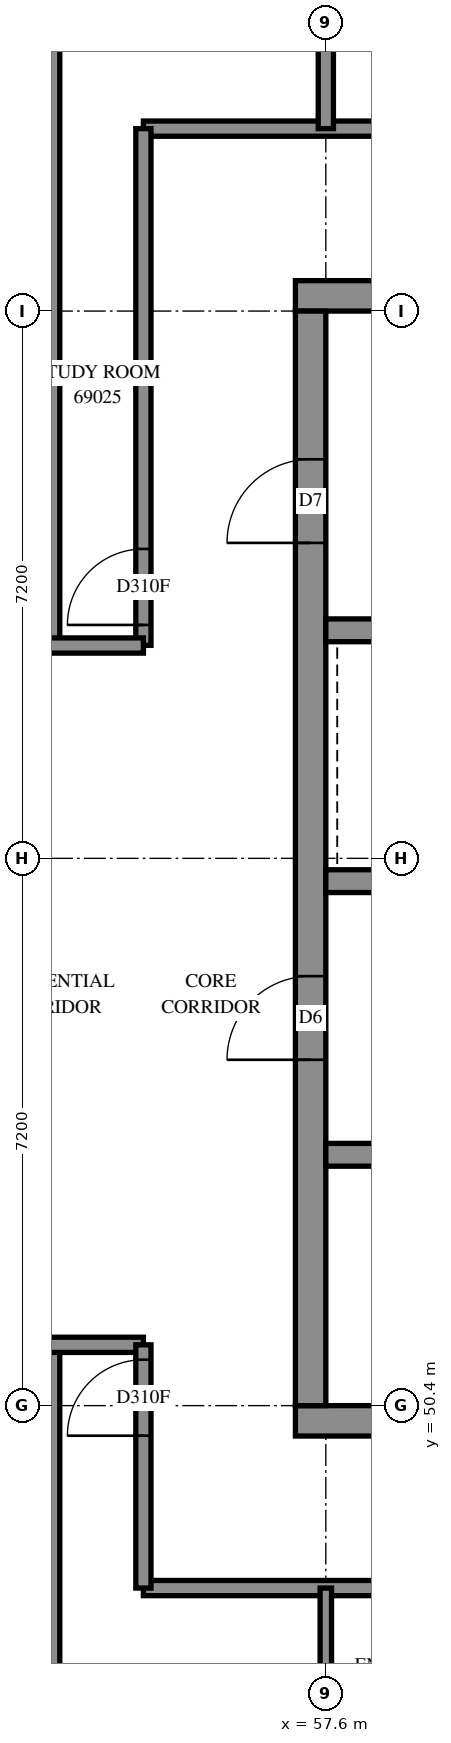
"""IFC4 building model, lengths in metres.
Left out: names, types, materials, properties, quantities, classifications, styles, units other than length and angle.
Written with IfcOpenShell. Run it as: python <this file> out.ifc"""

import sys

from ifc_helpers import new_model, si_unit, direction, frame, frame_2d, origin, place, context, subcontext, project, spatial, rectangle, extrude, element, fill, save


model = new_model("IFC4")
c1 = context("Model", 3, precision=1e-05, world=origin(), true_north=direction((0.0, 1.0)))
c2 = subcontext(c1, "Body", "Model", "MODEL_VIEW")
j1 = project(units=[si_unit("LENGTHUNIT", "METRE"), si_unit("PLANEANGLEUNIT", "RADIAN")], contexts=[c1])
p1 = place(None, origin())
s1 = spatial("IfcSite", under=j1, at=p1, CompositionType="ELEMENT")
p2 = place(p1, origin())
s2 = spatial("IfcBuilding", under=s1, at=p2, CompositionType="ELEMENT")
p3 = place(p2, frame((0.0, 0.0, 254.0)))
s3 = spatial("IfcBuildingStorey", under=s2, at=p3, CompositionType="ELEMENT", Elevation=254.0)
p4 = place(p3, frame((57.2, 50.2, -0.3), z_axis=(0.0, 0.0, 1.0), x_axis=(1.0, 0.0, 0.0)))
e1 = element("IfcWall", 1, at=p4, inside=s3, PredefinedType="SHEAR", context=c2, shape_type="SweptSolid", body=[
    extrude(rectangle(XDim=15.2, YDim=0.4, at=frame_2d((7.6, 0.0))), origin(), (0.0, 0.0, 1.0), 2.7),
])
p5 = place(p3, frame((57.2, 65.0, -0.3), z_axis=(0.0, 0.0, 1.0), x_axis=(1.0, 0.0, 0.0)))
e2 = element("IfcWall", 2, at=p5, inside=s3, PredefinedType="SHEAR", context=c2, shape_type="SweptSolid", body=[
    extrude(rectangle(XDim=15.2, YDim=0.4, at=frame_2d((7.6, 0.0))), origin(), (0.0, 0.0, 1.0), 2.7),
])
p6 = place(p5, frame((10.4, 0.0, 0.3)))
e3 = element("IfcOpeningElement", 3, at=p6, cuts=e2, PredefinedType="OPENING", context=c2, shape_type="SweptSolid", body=[
    extrude(rectangle(XDim=0.8, YDim=2.1, at=frame_2d((0.4, 1.05))), frame((0.0, 0.21, 0.0), z_axis=(0.0, -1.0, 0.0), x_axis=(1.0, 0.0, 0.0)), (0.0, 0.0, 1.0), 0.42),
])
p7 = place(p3, frame((57.4, 50.4, -0.3), z_axis=(0.0, 0.0, 1.0), x_axis=(0.0, 1.0, 0.0)))
e4 = element("IfcWall", 4, at=p7, inside=s3, PredefinedType="SHEAR", context=c2, shape_type="SweptSolid", body=[
    extrude(rectangle(XDim=14.4, YDim=0.4, at=frame_2d((7.2, 0.0))), origin(), (0.0, 0.0, 1.0), 2.7),
])
p8 = place(p7, frame((4.55, 0.0, 0.3)))
e5 = element("IfcOpeningElement", 5, at=p8, cuts=e4, PredefinedType="OPENING", context=c2, shape_type="SweptSolid", body=[
    extrude(rectangle(XDim=1.1, YDim=2.1, at=frame_2d((0.55, 1.05))), frame((0.0, 0.21, 0.0), z_axis=(0.0, -1.0, 0.0), x_axis=(1.0, 0.0, 0.0)), (0.0, 0.0, 1.0), 0.42),
])
p9 = place(p7, frame((11.35, 0.0, 0.3)))
e6 = element("IfcOpeningElement", 6, at=p9, cuts=e4, PredefinedType="OPENING", context=c2, shape_type="SweptSolid", body=[
    extrude(rectangle(XDim=1.1, YDim=2.1, at=frame_2d((0.55, 1.05))), frame((0.0, 0.21, 0.0), z_axis=(0.0, -1.0, 0.0), x_axis=(1.0, 0.0, 0.0)), (0.0, 0.0, 1.0), 0.42),
])
p10 = place(p3, frame((57.6, 53.7, 0.0), z_axis=(0.0, 0.0, 1.0), x_axis=(1.0, 0.0, 0.0)))
e7 = element("IfcWall", 7, at=p10, inside=s3, PredefinedType="SOLIDWALL", context=c2, shape_type="SweptSolid", body=[
    extrude(rectangle(XDim=14.4, YDim=0.3, at=frame_2d((7.2, 0.0))), origin(), (0.0, 0.0, 1.0), 3.1),
])
p11 = place(p10, frame((1.35, 0.0, 0.0)))
e8 = element("IfcOpeningElement", 8, at=p11, cuts=e7, PredefinedType="OPENING", context=c2, shape_type="SweptSolid", body=[
    extrude(rectangle(XDim=0.9, YDim=2.1, at=frame_2d((0.45, 1.05))), frame((0.0, 0.16, 0.0), z_axis=(0.0, -1.0, 0.0), x_axis=(1.0, 0.0, 0.0)), (0.0, 0.0, 1.0), 0.32),
])
p12 = place(p10, frame((4.95, 0.0, 0.0)))
e9 = element("IfcOpeningElement", 9, at=p12, cuts=e7, PredefinedType="OPENING", context=c2, shape_type="SweptSolid", body=[
    extrude(rectangle(XDim=0.9, YDim=2.1, at=frame_2d((0.45, 1.05))), frame((0.0, 0.16, 0.0), z_axis=(0.0, -1.0, 0.0), x_axis=(1.0, 0.0, 0.0)), (0.0, 0.0, 1.0), 0.32),
])
p13 = place(p10, frame((8.55, 0.0, 0.0)))
e10 = element("IfcOpeningElement", 10, at=p13, cuts=e7, PredefinedType="OPENING", context=c2, shape_type="SweptSolid", body=[
    extrude(rectangle(XDim=0.9, YDim=2.1, at=frame_2d((0.45, 1.05))), frame((0.0, 0.16, 0.0), z_axis=(0.0, -1.0, 0.0), x_axis=(1.0, 0.0, 0.0)), (0.0, 0.0, 1.0), 0.32),
])
p14 = place(p10, frame((12.05, 0.0, 0.0)))
e11 = element("IfcOpeningElement", 11, at=p14, cuts=e7, PredefinedType="OPENING", context=c2, shape_type="SweptSolid", body=[
    extrude(rectangle(XDim=1.1, YDim=2.1, at=frame_2d((0.55, 1.05))), frame((0.0, 0.16, 0.0), z_axis=(0.0, -1.0, 0.0), x_axis=(1.0, 0.0, 0.0)), (0.0, 0.0, 1.0), 0.32),
])
p15 = place(p3, frame((57.6, 57.3, 0.0), z_axis=(0.0, 0.0, 1.0), x_axis=(1.0, 0.0, 0.0)))
e12 = element("IfcWall", 12, at=p15, inside=s3, PredefinedType="SOLIDWALL", context=c2, shape_type="SweptSolid", body=[
    extrude(rectangle(XDim=14.4, YDim=0.3, at=frame_2d((7.2, 0.0))), origin(), (0.0, 0.0, 1.0), 3.1),
])
p16 = place(p15, frame((8.55, 0.0, 0.0)))
e13 = element("IfcOpeningElement", 13, at=p16, cuts=e12, PredefinedType="OPENING", context=c2, shape_type="SweptSolid", body=[
    extrude(rectangle(XDim=0.9, YDim=2.1, at=frame_2d((0.45, 1.05))), frame((0.0, 0.16, 0.0), z_axis=(0.0, -1.0, 0.0), x_axis=(1.0, 0.0, 0.0)), (0.0, 0.0, 1.0), 0.32),
])
p17 = place(p15, frame((1.25, 0.0, 0.0)))
e14 = element("IfcOpeningElement", 14, at=p17, cuts=e12, PredefinedType="OPENING", context=c2, shape_type="SweptSolid", body=[
    extrude(rectangle(XDim=1.1, YDim=2.1, at=frame_2d((0.55, 1.05))), frame((0.0, 0.16, 0.0), z_axis=(0.0, -1.0, 0.0), x_axis=(1.0, 0.0, 0.0)), (0.0, 0.0, 1.0), 0.32),
])
p18 = place(p15, frame((4.85, 0.0, 0.0)))
e15 = element("IfcOpeningElement", 15, at=p18, cuts=e12, PredefinedType="OPENING", context=c2, shape_type="SweptSolid", body=[
    extrude(rectangle(XDim=1.1, YDim=2.1, at=frame_2d((0.55, 1.05))), frame((0.0, 0.16, 0.0), z_axis=(0.0, -1.0, 0.0), x_axis=(1.0, 0.0, 0.0)), (0.0, 0.0, 1.0), 0.32),
])
p19 = place(p15, frame((12.05, 0.0, 0.0)))
e16 = element("IfcOpeningElement", 16, at=p19, cuts=e12, PredefinedType="OPENING", context=c2, shape_type="SweptSolid", body=[
    extrude(rectangle(XDim=1.1, YDim=2.1, at=frame_2d((0.55, 1.05))), frame((0.0, 0.16, 0.0), z_axis=(0.0, -1.0, 0.0), x_axis=(1.0, 0.0, 0.0)), (0.0, 0.0, 1.0), 0.32),
])
p20 = place(p3, frame((57.6, 60.6, 0.0), z_axis=(0.0, 0.0, 1.0), x_axis=(1.0, 0.0, 0.0)))
e17 = element("IfcWall", 17, at=p20, inside=s3, PredefinedType="SOLIDWALL", context=c2, shape_type="SweptSolid", body=[
    extrude(rectangle(XDim=7.2, YDim=0.3, at=frame_2d((3.6, 0.0))), origin(), (0.0, 0.0, 1.0), 3.1),
])
p21 = place(p3, frame((55.2, 67.2, 0.0), z_axis=(0.0, 0.0, 1.0), x_axis=(1.0, 0.0, 0.0)))
e18 = element("IfcWall", 18, at=p21, inside=s3, PredefinedType="PARTITIONING", context=c2, shape_type="SweptSolid", body=[
    extrude(rectangle(XDim=19.2, YDim=0.2, at=frame_2d((9.6, 0.0))), origin(), (0.0, 0.0, 1.0), 3.1),
])
p22 = place(p21, frame((4.475, 0.0, 0.0)))
e19 = element("IfcOpeningElement", 19, at=p22, cuts=e18, PredefinedType="OPENING", context=c2, shape_type="SweptSolid", body=[
    extrude(rectangle(XDim=1.0, YDim=2.1, at=frame_2d((0.5, 1.05))), frame((0.0, 0.11, 0.0), z_axis=(0.0, -1.0, 0.0), x_axis=(1.0, 0.0, 0.0)), (0.0, 0.0, 1.0), 0.22),
])
p23 = place(p21, frame((8.301, 0.0, 0.0)))
e20 = element("IfcOpeningElement", 20, at=p23, cuts=e18, PredefinedType="OPENING", context=c2, shape_type="SweptSolid", body=[
    extrude(rectangle(XDim=0.9, YDim=2.1, at=frame_2d((0.45, 1.05))), frame((0.0, 0.11, 0.0), z_axis=(0.0, -1.0, 0.0), x_axis=(1.0, 0.0, 0.0)), (0.0, 0.0, 1.0), 0.22),
])
p24 = place(p21, frame((13.88, 0.0, 0.0)))
e21 = element("IfcOpeningElement", 21, at=p24, cuts=e18, PredefinedType="OPENING", context=c2, shape_type="SweptSolid", body=[
    extrude(rectangle(XDim=1.0, YDim=2.1, at=frame_2d((0.5, 1.05))), frame((0.0, 0.11, 0.0), z_axis=(0.0, -1.0, 0.0), x_axis=(1.0, 0.0, 0.0)), (0.0, 0.0, 1.0), 0.22),
])
p25 = place(p3, frame((55.2, 48.0, 0.0), z_axis=(0.0, 0.0, 1.0), x_axis=(1.0, 0.0, 0.0)))
e22 = element("IfcWall", 22, at=p25, inside=s3, PredefinedType="PARTITIONING", context=c2, shape_type="SweptSolid", body=[
    extrude(rectangle(XDim=19.15, YDim=0.2, at=frame_2d((9.575, 0.0))), origin(), (0.0, 0.0, 1.0), 3.1),
])
p26 = place(p25, frame((6.343, 0.0, 0.0)))
e23 = element("IfcOpeningElement", 23, at=p26, cuts=e22, PredefinedType="OPENING", context=c2, shape_type="SweptSolid", body=[
    extrude(rectangle(XDim=0.9, YDim=2.1, at=frame_2d((0.45, 1.05))), frame((0.0, 0.11, 0.0), z_axis=(0.0, -1.0, 0.0), x_axis=(1.0, 0.0, 0.0)), (0.0, 0.0, 1.0), 0.22),
])
p27 = place(p25, frame((11.633, 0.0, 0.0)))
e24 = element("IfcOpeningElement", 24, at=p27, cuts=e22, PredefinedType="OPENING", context=c2, shape_type="SweptSolid", body=[
    extrude(rectangle(XDim=1.0, YDim=2.1, at=frame_2d((0.5, 1.05))), frame((0.0, 0.11, 0.0), z_axis=(0.0, -1.0, 0.0), x_axis=(1.0, 0.0, 0.0)), (0.0, 0.0, 1.0), 0.22),
])
p28 = place(p25, frame((13.707, 0.0, 0.0)))
e25 = element("IfcOpeningElement", 25, at=p28, cuts=e22, PredefinedType="OPENING", context=c2, shape_type="SweptSolid", body=[
    extrude(rectangle(XDim=1.0, YDim=2.1, at=frame_2d((0.5, 1.05))), frame((0.0, 0.11, 0.0), z_axis=(0.0, -1.0, 0.0), x_axis=(1.0, 0.0, 0.0)), (0.0, 0.0, 1.0), 0.22),
])
p29 = place(p3, frame((54.0, 60.4, 0.0), z_axis=(0.0, 0.0, 1.0), x_axis=(0.0, 1.0, 0.0)))
e26 = element("IfcWall", 26, at=p29, inside=s3, PredefinedType="PARTITIONING", context=c2, shape_type="SweptSolid", body=[
    extrude(rectangle(XDim=12.413, YDim=0.2, at=frame_2d((6.207, 0.0))), origin(), (0.0, 0.0, 1.0), 3.1),
])
p30 = place(p3, frame((54.0, 42.321, 0.0), z_axis=(0.0, 0.0, 1.0), x_axis=(0.0, 1.0, 0.0)))
e27 = element("IfcWall", 27, at=p30, inside=s3, PredefinedType="PARTITIONING", context=c2, shape_type="SweptSolid", body=[
    extrude(rectangle(XDim=8.879, YDim=0.2, at=frame_2d((4.439, 0.0))), origin(), (0.0, 0.0, 1.0), 3.1),
])
p31 = place(p3, frame((55.2, 60.402, 0.0), z_axis=(0.0, 0.0, 1.0), x_axis=(0.0, 1.0, 0.0)))
e28 = element("IfcWall", 28, at=p31, inside=s3, PredefinedType="PARTITIONING", context=c2, shape_type="SweptSolid", body=[
    extrude(rectangle(XDim=6.798, YDim=0.2, at=frame_2d((3.399, 0.0))), origin(), (0.0, 0.0, 1.0), 3.1),
])
p32 = place(p31, frame((0.269, 0.0, 0.0)))
e29 = element("IfcOpeningElement", 29, at=p32, cuts=e28, PredefinedType="OPENING", context=c2, shape_type="SweptSolid", body=[
    extrude(rectangle(XDim=1.0, YDim=2.1, at=frame_2d((0.5, 1.05))), frame((0.0, 0.11, 0.0), z_axis=(0.0, -1.0, 0.0), x_axis=(1.0, 0.0, 0.0)), (0.0, 0.0, 1.0), 0.22),
])
p33 = place(p3, frame((57.6, 67.2, 0.0), z_axis=(0.0, 0.0, 1.0), x_axis=(0.0, 1.0, 0.0)))
e30 = element("IfcWall", 30, at=p33, inside=s3, PredefinedType="PARTITIONING", context=c2, shape_type="SweptSolid", body=[
    extrude(rectangle(XDim=4.45, YDim=0.2, at=frame_2d((2.225, 0.0))), origin(), (0.0, 0.0, 1.0), 3.1),
])
p34 = place(p3, frame((50.85, 51.2, 0.0), z_axis=(0.0, 0.0, 1.0), x_axis=(1.0, 0.0, 0.0)))
e31 = element("IfcWall", 31, at=p34, inside=s3, PredefinedType="PARTITIONING", context=c2, shape_type="SweptSolid", body=[
    extrude(rectangle(XDim=4.35, YDim=0.2, at=frame_2d((2.175, 0.0))), origin(), (0.0, 0.0, 1.0), 3.1),
])
p35 = place(p34, frame((1.931, 0.0, 0.0)))
e32 = element("IfcOpeningElement", 32, at=p35, cuts=e31, PredefinedType="OPENING", context=c2, shape_type="SweptSolid", body=[
    extrude(rectangle(XDim=1.0, YDim=2.1, at=frame_2d((0.5, 1.05))), frame((0.0, 0.11, 0.0), z_axis=(0.0, -1.0, 0.0), x_axis=(1.0, 0.0, 0.0)), (0.0, 0.0, 1.0), 0.22),
])
p36 = place(p3, frame((50.85, 60.4, 0.0), z_axis=(0.0, 0.0, 1.0), x_axis=(1.0, 0.0, 0.0)))
e33 = element("IfcWall", 33, at=p36, inside=s3, PredefinedType="PARTITIONING", context=c2, shape_type="SweptSolid", body=[
    extrude(rectangle(XDim=4.35, YDim=0.2, at=frame_2d((2.175, 0.0))), origin(), (0.0, 0.0, 1.0), 3.1),
])
p37 = place(p36, frame((1.946, 0.0, 0.0)))
e34 = element("IfcOpeningElement", 34, at=p37, cuts=e33, PredefinedType="OPENING", context=c2, shape_type="SweptSolid", body=[
    extrude(rectangle(XDim=1.0, YDim=2.1, at=frame_2d((0.5, 1.05))), frame((0.0, 0.11, 0.0), z_axis=(0.0, -1.0, 0.0), x_axis=(1.0, 0.0, 0.0)), (0.0, 0.0, 1.0), 0.22),
])
p38 = place(p3, frame((55.2, 48.0, 0.0), z_axis=(0.0, 0.0, 1.0), x_axis=(0.0, 1.0, 0.0)))
e35 = element("IfcWall", 35, at=p38, inside=s3, PredefinedType="PARTITIONING", context=c2, shape_type="SweptSolid", body=[
    extrude(rectangle(XDim=3.2, YDim=0.2, at=frame_2d((1.6, 0.0))), origin(), (0.0, 0.0, 1.0), 3.1),
])
p39 = place(p38, frame((2.004, 0.0, 0.0)))
e36 = element("IfcOpeningElement", 36, at=p39, cuts=e35, PredefinedType="OPENING", context=c2, shape_type="SweptSolid", body=[
    extrude(rectangle(XDim=1.0, YDim=2.1, at=frame_2d((0.5, 1.05))), frame((0.0, 0.11, 0.0), z_axis=(0.0, -1.0, 0.0), x_axis=(1.0, 0.0, 0.0)), (0.0, 0.0, 1.0), 0.22),
])
p40 = place(p3, frame((57.6, 45.6, 0.0), z_axis=(0.0, 0.0, 1.0), x_axis=(0.0, 1.0, 0.0)))
e37 = element("IfcWall", 37, at=p40, inside=s3, PredefinedType="PARTITIONING", context=c2, shape_type="SweptSolid", body=[
    extrude(rectangle(XDim=2.4, YDim=0.15, at=frame_2d((1.2, 0.0))), origin(), (0.0, 0.0, 1.0), 3.1),
])
p41 = place(p8, origin())
e38 = element("IfcDoor", 38, at=p41, inside=s3, OperationType="DOUBLE_DOOR_SINGLE_SWING", PredefinedType="DOOR", context=c2, shape_type="SweptSolid", body=[
    extrude(rectangle(XDim=1.1, YDim=2.1, at=frame_2d((0.55, 1.05))), frame((0.0, 0.025, 0.0), z_axis=(0.0, -1.0, 0.0), x_axis=(1.0, 0.0, 0.0)), (0.0, 0.0, 1.0), 0.05),
])
fill(e5, e38)
p42 = place(p9, origin())
e39 = element("IfcDoor", 39, at=p42, inside=s3, OperationType="SINGLE_SWING_LEFT", PredefinedType="DOOR", context=c2, shape_type="SweptSolid", body=[
    extrude(rectangle(XDim=1.1, YDim=2.1, at=frame_2d((0.55, 1.05))), frame((0.0, 0.025, 0.0), z_axis=(0.0, -1.0, 0.0), x_axis=(1.0, 0.0, 0.0)), (0.0, 0.0, 1.0), 0.05),
])
fill(e6, e39)
p43 = place(p39, origin())
e40 = element("IfcDoor", 40, at=p43, inside=s3, OperationType="SINGLE_SWING_RIGHT", PredefinedType="DOOR", context=c2, shape_type="SweptSolid", body=[
    extrude(rectangle(XDim=1.0, YDim=2.1, at=frame_2d((0.5, 1.05))), frame((0.0, 0.025, 0.0), z_axis=(0.0, -1.0, 0.0), x_axis=(1.0, 0.0, 0.0)), (0.0, 0.0, 1.0), 0.05),
])
fill(e36, e40)
p44 = place(p32, origin())
e41 = element("IfcDoor", 41, at=p44, inside=s3, OperationType="SINGLE_SWING_LEFT", PredefinedType="DOOR", context=c2, shape_type="SweptSolid", body=[
    extrude(rectangle(XDim=1.0, YDim=2.1, at=frame_2d((0.5, 1.05))), frame((0.0, 0.025, 0.0), z_axis=(0.0, -1.0, 0.0), x_axis=(1.0, 0.0, 0.0)), (0.0, 0.0, 1.0), 0.05),
])
fill(e29, e41)
save(model, sys.argv[1])
